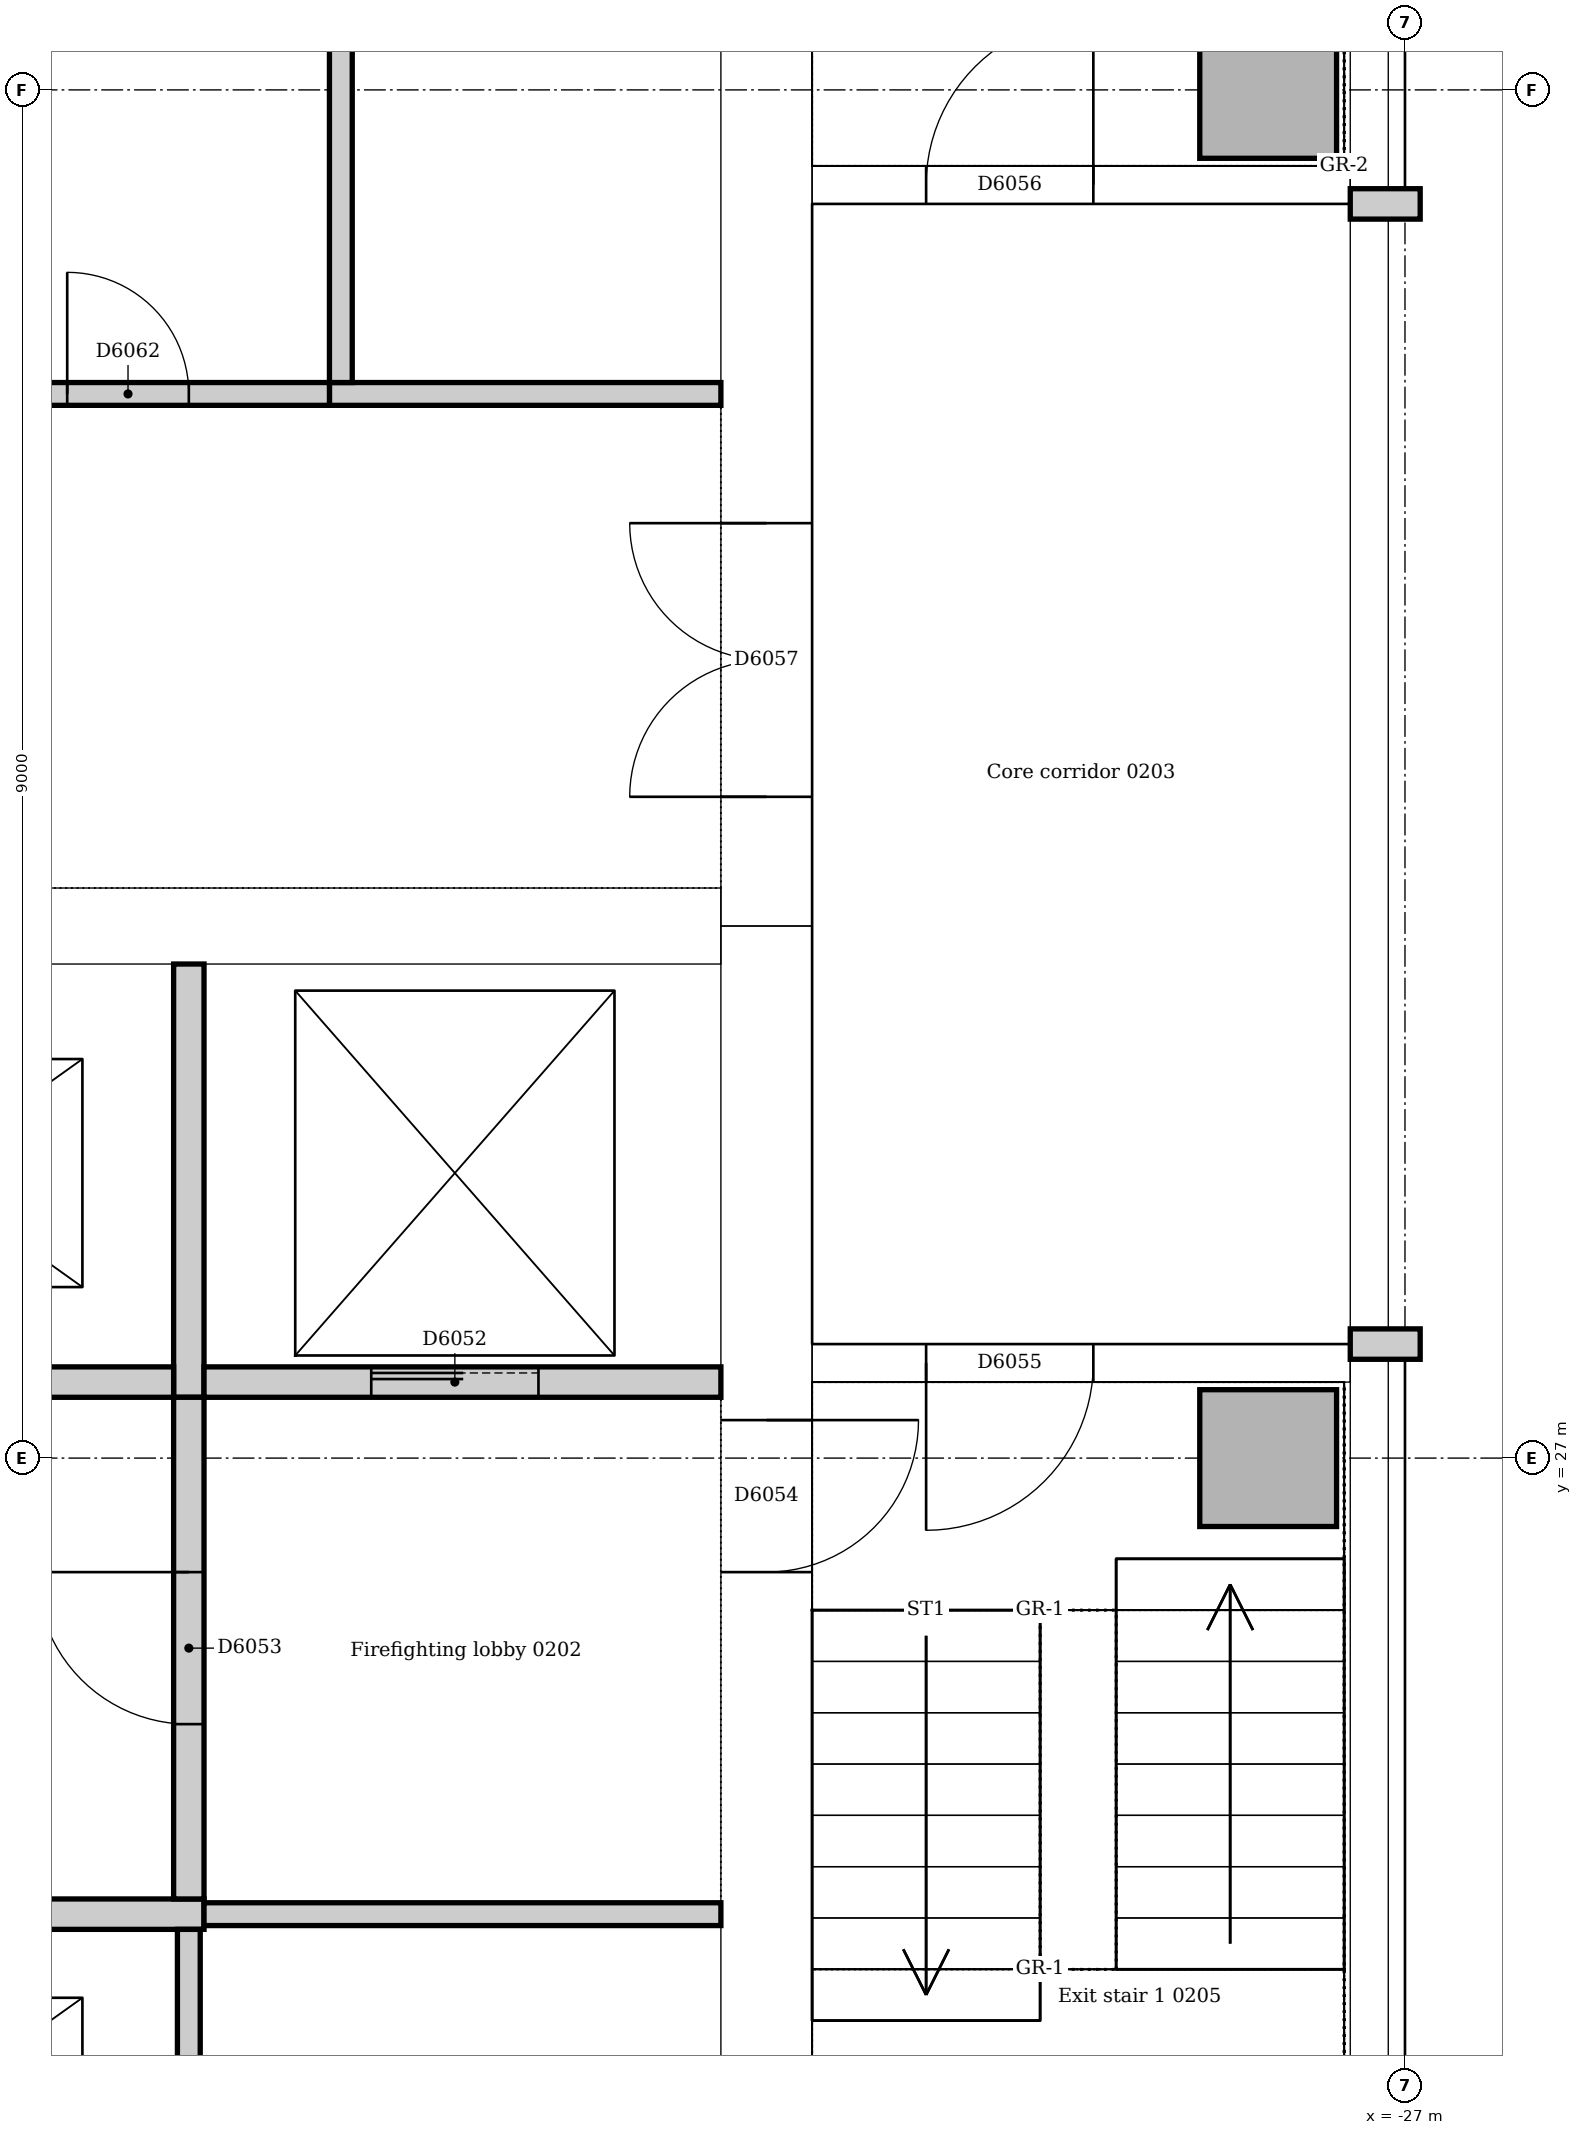
"""IFC4 building model, lengths in metres.
Left out: names, types, materials, properties, quantities, classifications, styles, units other than length and angle.
Written with IfcOpenShell. Run it as: python <this file> out.ifc"""

import sys

from ifc_helpers import new_model, si_unit, direction, frame, frame_2d, origin, origin_2d, place, context, subcontext, project, spatial, rectangle, extrude, element, fill, save


model = new_model("IFC4")
c1 = context("Model", 3, precision=1e-05, world=origin(), true_north=direction((0.0, 1.0)))
c2 = subcontext(c1, "Body", "Model", "MODEL_VIEW")
j1 = project(units=[si_unit("LENGTHUNIT", "METRE"), si_unit("PLANEANGLEUNIT", "RADIAN")], contexts=[c1])
p1 = place(None, origin())
s1 = spatial("IfcSite", under=j1, at=p1, CompositionType="ELEMENT")
p2 = place(p1, origin())
s2 = spatial("IfcBuilding", under=s1, at=p2, CompositionType="ELEMENT")
p3 = place(p2, frame((0.0, 0.0, 11.0)))
s3 = spatial("IfcBuildingStorey", under=s2, at=p3, CompositionType="ELEMENT", Elevation=11.0)
p4 = place(p3, frame((-31.2, 21.0, 0.0), z_axis=(0.0, 0.0, 1.0), x_axis=(0.0, 1.0, 0.0)))
e1 = element("IfcWall", 1, at=p4, inside=s3, PredefinedType="SOLIDWALL", context=c2, shape_type="SweptSolid", body=[
    extrude(rectangle(XDim=9.5, YDim=0.6, at=frame_2d((4.75, 0.0))), origin(), (0.0, 0.0, 1.0), 5.0),
])
p5 = place(p4, frame((5.25, 0.0, 0.0)))
e2 = element("IfcOpeningElement", 2, at=p5, cuts=e1, PredefinedType="OPENING", context=c2, shape_type="SweptSolid", body=[
    extrude(rectangle(XDim=1.0, YDim=2.1, at=frame_2d((0.5, 1.05))), frame((0.0, 0.31, 0.0), z_axis=(0.0, -1.0, 0.0), x_axis=(1.0, 0.0, 0.0)), (0.0, 0.0, 1.0), 0.62),
])
p6 = place(p3, frame((-31.2, 30.5, 0.0), z_axis=(0.0, 0.0, 1.0), x_axis=(0.0, 1.0, 0.0)))
e3 = element("IfcWall", 3, at=p6, inside=s3, PredefinedType="SOLIDWALL", context=c2, shape_type="SweptSolid", body=[
    extrude(rectangle(XDim=11.5, YDim=0.6, at=frame_2d((5.75, 0.0))), origin(), (0.0, 0.0, 1.0), 5.0),
])
p7 = place(p6, frame((0.85, 0.0, 0.0)))
e4 = element("IfcOpeningElement", 4, at=p7, cuts=e3, PredefinedType="OPENING", context=c2, shape_type="SweptSolid", body=[
    extrude(rectangle(XDim=1.8, YDim=2.1, at=frame_2d((0.9, 1.05))), frame((0.0, 0.31, 0.0), z_axis=(0.0, -1.0, 0.0), x_axis=(1.0, 0.0, 0.0)), (0.0, 0.0, 1.0), 0.62),
])
p8 = place(p3, frame((-42.0, 30.5, 0.0), z_axis=(0.0, 0.0, 1.0), x_axis=(1.0, 0.0, 0.0)))
e5 = element("IfcWall", 5, at=p8, inside=s3, PredefinedType="SOLIDWALL", context=c2, shape_type="SweptSolid", body=[
    extrude(rectangle(XDim=10.5, YDim=0.5, at=frame_2d((5.25, 0.0))), origin(), (0.0, 0.0, 1.0), 5.0),
])
p9 = place(p3, frame((-27.36, 27.625, 0.0), z_axis=(0.0, 0.0, 1.0), x_axis=(-1.0, 0.0, 0.0)))
e6 = element("IfcWall", 6, at=p9, inside=s3, PredefinedType="SOLIDWALL", context=c2, shape_type="SweptSolid", body=[
    extrude(rectangle(XDim=3.54, YDim=0.25, at=frame_2d((1.77, 0.0))), origin(), (0.0, 0.0, 1.0), 5.0),
])
p10 = place(p9, frame((1.69, 0.0, 0.0)))
e7 = element("IfcOpeningElement", 7, at=p10, cuts=e6, PredefinedType="OPENING", context=c2, shape_type="SweptSolid", body=[
    extrude(rectangle(XDim=1.1, YDim=2.1, at=frame_2d((0.55, 1.05))), frame((0.0, 0.135, 0.0), z_axis=(0.0, -1.0, 0.0), x_axis=(1.0, 0.0, 0.0)), (0.0, 0.0, 1.0), 0.27),
])
p11 = place(p3, frame((-30.9, 35.375, 0.0), z_axis=(0.0, 0.0, 1.0), x_axis=(1.0, 0.0, 0.0)))
e8 = element("IfcWall", 8, at=p11, inside=s3, PredefinedType="SOLIDWALL", context=c2, shape_type="SweptSolid", body=[
    extrude(rectangle(XDim=3.54, YDim=0.25, at=frame_2d((1.77, 0.0))), origin(), (0.0, 0.0, 1.0), 5.0),
])
p12 = place(p11, frame((0.75, 0.0, 0.0)))
e9 = element("IfcOpeningElement", 9, at=p12, cuts=e8, PredefinedType="OPENING", context=c2, shape_type="SweptSolid", body=[
    extrude(rectangle(XDim=1.1, YDim=2.1, at=frame_2d((0.55, 1.05))), frame((0.0, 0.135, 0.0), z_axis=(0.0, -1.0, 0.0), x_axis=(1.0, 0.0, 0.0)), (0.0, 0.0, 1.0), 0.27),
])
p13 = place(p3, frame((-27.235, 21.0, 0.0), z_axis=(0.0, 0.0, 1.0), x_axis=(0.0, 1.0, 0.0)))
e10 = element("IfcWall", 10, at=p13, inside=s3, PredefinedType="SOLIDWALL", context=c2, shape_type="SweptSolid", body=[
    extrude(rectangle(XDim=6.65, YDim=0.25, at=frame_2d((3.325, 0.0))), origin(), (0.0, 0.0, 1.0), 5.0),
])
p14 = place(p3, frame((-27.235, 27.85, 0.0), z_axis=(0.0, 0.0, 1.0), x_axis=(0.0, 1.0, 0.0)))
e11 = element("IfcWall", 11, at=p14, inside=s3, PredefinedType="SOLIDWALL", context=c2, shape_type="SweptSolid", body=[
    extrude(rectangle(XDim=7.3, YDim=0.25, at=frame_2d((3.65, 0.0))), origin(), (0.0, 0.0, 1.0), 5.0),
])
p15 = place(p3, frame((-27.235, 35.35, 0.0), z_axis=(0.0, 0.0, 1.0), x_axis=(0.0, 1.0, 0.0)))
e12 = element("IfcWall", 12, at=p15, inside=s3, PredefinedType="SOLIDWALL", context=c2, shape_type="SweptSolid", body=[
    extrude(rectangle(XDim=6.65, YDim=0.25, at=frame_2d((3.325, 0.0))), origin(), (0.0, 0.0, 1.0), 5.0),
])
for number, where, z_axis, x_axis in (
    (13, (-27.9, 27.0, 0.0), (0.0, 0.0, 1.0), (1.0, 0.0, 0.0)),
    (14, (-27.9, 36.0, 0.0), (0.0, 0.0, 1.0), (1.0, 0.0, 0.0)),
):
    element("IfcColumn", number, at=place(p3, frame(where, z_axis=z_axis, x_axis=x_axis)), inside=s3, PredefinedType="COLUMN", context=c2, shape_type="SweptSolid", body=[
        extrude(rectangle(XDim=0.9, YDim=0.9, at=origin_2d()), origin(), (0.0, 0.0, 1.0), 5.0),
    ])
p16 = place(p3, frame((-34.9, 24.0, 0.0), z_axis=(0.0, 0.0, 1.0), x_axis=(-1.0, 0.0, 0.0)))
e15 = element("IfcWall", 15, at=p16, inside=s3, PredefinedType="SOLIDWALL", context=c2, shape_type="SweptSolid", body=[
    extrude(rectangle(XDim=3.5, YDim=0.2, at=frame_2d((1.75, 0.0))), origin(), (0.0, 0.0, 1.0), 5.0),
])
p17 = place(p16, frame((1.3, 0.0, 0.0)))
e16 = element("IfcOpeningElement", 16, at=p17, cuts=e15, PredefinedType="OPENING", context=c2, shape_type="SweptSolid", body=[
    extrude(rectangle(XDim=1.1, YDim=2.1, at=frame_2d((0.55, 1.05))), frame((0.0, 0.11, 0.0), z_axis=(0.0, -1.0, 0.0), x_axis=(1.0, 0.0, 0.0)), (0.0, 0.0, 1.0), 0.22),
])
p18 = place(p3, frame((-35.0, 27.4, 0.0), z_axis=(0.0, 0.0, 1.0), x_axis=(0.0, 1.0, 0.0)))
e17 = element("IfcWall", 17, at=p18, inside=s3, PredefinedType="SOLIDWALL", context=c2, shape_type="SweptSolid", body=[
    extrude(rectangle(XDim=2.85, YDim=0.2, at=frame_2d((1.425, 0.0))), origin(), (0.0, 0.0, 1.0), 5.0),
])
p19 = place(p3, frame((-38.4, 27.5, 0.0), z_axis=(0.0, 0.0, 1.0), x_axis=(1.0, 0.0, 0.0)))
e18 = element("IfcWall", 18, at=p19, inside=s3, PredefinedType="SOLIDWALL", context=c2, shape_type="SweptSolid", body=[
    extrude(rectangle(XDim=3.3, YDim=0.2, at=frame_2d((1.65, 0.0))), origin(), (0.0, 0.0, 1.0), 5.0),
])
p20 = place(p19, frame((1.1, 0.0, 0.0)))
e19 = element("IfcOpeningElement", 19, at=p20, cuts=e18, PredefinedType="OPENING", context=c2, shape_type="SweptSolid", body=[
    extrude(rectangle(XDim=1.1, YDim=2.1, at=frame_2d((0.55, 1.05))), frame((0.0, 0.11, 0.0), z_axis=(0.0, -1.0, 0.0), x_axis=(1.0, 0.0, 0.0)), (0.0, 0.0, 1.0), 0.22),
])
p21 = place(p3, frame((-34.9, 27.5, 0.0), z_axis=(0.0, 0.0, 1.0), x_axis=(1.0, 0.0, 0.0)))
e20 = element("IfcWall", 20, at=p21, inside=s3, PredefinedType="SOLIDWALL", context=c2, shape_type="SweptSolid", body=[
    extrude(rectangle(XDim=3.4, YDim=0.2, at=frame_2d((1.7, 0.0))), origin(), (0.0, 0.0, 1.0), 5.0),
])
p22 = place(p21, frame((1.1, 0.0, 0.0)))
e21 = element("IfcOpeningElement", 21, at=p22, cuts=e20, PredefinedType="OPENING", context=c2, shape_type="SweptSolid", body=[
    extrude(rectangle(XDim=1.1, YDim=2.1, at=frame_2d((0.55, 1.05))), frame((0.0, 0.11, 0.0), z_axis=(0.0, -1.0, 0.0), x_axis=(1.0, 0.0, 0.0)), (0.0, 0.0, 1.0), 0.22),
])
p23 = place(p3, frame((-35.0, 24.1, 0.0), z_axis=(0.0, 0.0, 1.0), x_axis=(0.0, 1.0, 0.0)))
e22 = element("IfcWall", 22, at=p23, inside=s3, PredefinedType="SOLIDWALL", context=c2, shape_type="SweptSolid", body=[
    extrude(rectangle(XDim=3.3, YDim=0.2, at=frame_2d((1.65, 0.0))), origin(), (0.0, 0.0, 1.0), 5.0),
])
p24 = place(p23, frame((1.15, 0.0, 0.0)))
e23 = element("IfcOpeningElement", 23, at=p24, cuts=e22, PredefinedType="OPENING", context=c2, shape_type="SweptSolid", body=[
    extrude(rectangle(XDim=1.0, YDim=2.1, at=frame_2d((0.5, 1.05))), frame((0.0, 0.11, 0.0), z_axis=(0.0, -1.0, 0.0), x_axis=(1.0, 0.0, 0.0)), (0.0, 0.0, 1.0), 0.22),
])
for number, where, z_axis, x_axis in (
    (24, (-27.36, 27.75, 0.0), (0.0, 0.0, 1.0), (1.0, 0.0, 0.0)),
    (25, (-26.9, 35.25, 0.0), (0.0, 0.0, 1.0), (-1.0, 0.0, 0.0)),
):
    element("IfcWall", number, at=place(p3, frame(where, z_axis=z_axis, x_axis=x_axis)), inside=s3, PredefinedType="SOLIDWALL", context=c2, shape_type="SweptSolid", body=[
        extrude(rectangle(XDim=0.46, YDim=0.2, at=frame_2d((0.23, 0.0))), origin(), (0.0, 0.0, 1.0), 5.0),
    ])
p25 = place(p3, frame((-35.0, 21.0, 0.0), z_axis=(0.0, 0.0, 1.0), x_axis=(0.0, 1.0, 0.0)))
e26 = element("IfcWall", 26, at=p25, inside=s3, PredefinedType="SOLIDWALL", context=c2, shape_type="SweptSolid", body=[
    extrude(rectangle(XDim=2.9, YDim=0.15, at=frame_2d((1.45, 0.0))), origin(), (0.0, 0.0, 1.0), 5.0),
])
p26 = place(p3, frame((-31.5, 24.0, 0.0), z_axis=(0.0, 0.0, 1.0), x_axis=(-1.0, 0.0, 0.0)))
e27 = element("IfcWall", 27, at=p26, inside=s3, PredefinedType="SOLIDWALL", context=c2, shape_type="SweptSolid", body=[
    extrude(rectangle(XDim=3.4, YDim=0.15, at=frame_2d((1.7, 0.0))), origin(), (0.0, 0.0, 1.0), 5.0),
])
p27 = place(p3, frame((-34.075, 34.0, 0.0), z_axis=(0.0, 0.0, 1.0), x_axis=(1.0, 0.0, 0.0)))
e28 = element("IfcWall", 28, at=p27, inside=s3, PredefinedType="SOLIDWALL", context=c2, shape_type="SweptSolid", body=[
    extrude(rectangle(XDim=2.575, YDim=0.15, at=frame_2d((1.288, 0.0))), origin(), (0.0, 0.0, 1.0), 5.0),
])
p28 = place(p3, frame((-34.0, 41.075, 0.0), z_axis=(0.0, 0.0, 1.0), x_axis=(0.0, -1.0, 0.0)))
e29 = element("IfcWall", 29, at=p28, inside=s3, PredefinedType="SOLIDWALL", context=c2, shape_type="SweptSolid", body=[
    extrude(rectangle(XDim=7.0, YDim=0.15, at=frame_2d((3.5, 0.0))), origin(), (0.0, 0.0, 1.0), 5.0),
])
p29 = place(p3, frame((-34.075, 34.0, 0.0), z_axis=(0.0, 0.0, 1.0), x_axis=(-1.0, 0.0, 0.0)))
e30 = element("IfcWall", 30, at=p29, inside=s3, PredefinedType="PARTITIONING", context=c2, shape_type="SweptSolid", body=[
    extrude(rectangle(XDim=2.65, YDim=0.15, at=frame_2d((1.325, 0.0))), origin(), (0.0, 0.0, 1.0), 4.7),
])
p30 = place(p29, frame((0.925, 0.0, 0.0)))
e31 = element("IfcOpeningElement", 31, at=p30, cuts=e30, PredefinedType="OPENING", context=c2, shape_type="SweptSolid", body=[
    extrude(rectangle(XDim=0.8, YDim=2.1, at=frame_2d((0.4, 1.05))), frame((0.0, 0.085, 0.0), z_axis=(0.0, -1.0, 0.0), x_axis=(1.0, 0.0, 0.0)), (0.0, 0.0, 1.0), 0.17),
])
p31 = place(p22, origin())
e32 = element("IfcDoor", 32, at=p31, inside=s3, OperationType="SLIDING_TO_LEFT", PredefinedType="DOOR", context=c2, shape_type="SweptSolid", body=[
    extrude(rectangle(XDim=1.1, YDim=2.1, at=frame_2d((0.55, 1.05))), frame((0.0, 0.025, 0.0), z_axis=(0.0, -1.0, 0.0), x_axis=(1.0, 0.0, 0.0)), (0.0, 0.0, 1.0), 0.05),
])
fill(e21, e32)
p32 = place(p24, origin())
e33 = element("IfcDoor", 33, at=p32, inside=s3, OperationType="SINGLE_SWING_RIGHT", PredefinedType="DOOR", context=c2, shape_type="SweptSolid", body=[
    extrude(rectangle(XDim=1.0, YDim=2.1, at=frame_2d((0.5, 1.05))), frame((0.0, 0.025, 0.0), z_axis=(0.0, -1.0, 0.0), x_axis=(1.0, 0.0, 0.0)), (0.0, 0.0, 1.0), 0.05),
])
fill(e23, e33)
p33 = place(p5, frame((1.0, 0.0, 0.0), z_axis=(0.0, 0.0, 1.0), x_axis=(-1.0, 0.0, 0.0)))
e34 = element("IfcDoor", 34, at=p33, inside=s3, OperationType="SINGLE_SWING_LEFT", PredefinedType="DOOR", context=c2, shape_type="SweptSolid", body=[
    extrude(rectangle(XDim=1.0, YDim=2.1, at=frame_2d((0.5, 1.05))), frame((0.0, 0.025, 0.0), z_axis=(0.0, -1.0, 0.0), x_axis=(1.0, 0.0, 0.0)), (0.0, 0.0, 1.0), 0.05),
])
fill(e2, e34)
p34 = place(p10, origin())
e35 = element("IfcDoor", 35, at=p34, inside=s3, OperationType="SINGLE_SWING_RIGHT", PredefinedType="DOOR", context=c2, shape_type="SweptSolid", body=[
    extrude(rectangle(XDim=1.1, YDim=2.1, at=frame_2d((0.55, 1.05))), frame((0.0, 0.025, 0.0), z_axis=(0.0, -1.0, 0.0), x_axis=(1.0, 0.0, 0.0)), (0.0, 0.0, 1.0), 0.05),
])
fill(e7, e35)
p35 = place(p12, origin())
e36 = element("IfcDoor", 36, at=p35, inside=s3, OperationType="SINGLE_SWING_RIGHT", PredefinedType="DOOR", context=c2, shape_type="SweptSolid", body=[
    extrude(rectangle(XDim=1.1, YDim=2.1, at=frame_2d((0.55, 1.05))), frame((0.0, 0.025, 0.0), z_axis=(0.0, -1.0, 0.0), x_axis=(1.0, 0.0, 0.0)), (0.0, 0.0, 1.0), 0.05),
])
fill(e9, e36)
p36 = place(p7, origin())
e37 = element("IfcDoor", 37, at=p36, inside=s3, OperationType="DOUBLE_DOOR_SINGLE_SWING", PredefinedType="DOOR", context=c2, shape_type="SweptSolid", body=[
    extrude(rectangle(XDim=1.8, YDim=2.1, at=frame_2d((0.9, 1.05))), frame((0.0, 0.025, 0.0), z_axis=(0.0, -1.0, 0.0), x_axis=(1.0, 0.0, 0.0)), (0.0, 0.0, 1.0), 0.05),
])
fill(e4, e37)
p37 = place(p30, frame((0.8, 0.0, 0.0), z_axis=(0.0, 0.0, 1.0), x_axis=(-1.0, 0.0, 0.0)))
e38 = element("IfcDoor", 38, at=p37, inside=s3, OperationType="SINGLE_SWING_LEFT", PredefinedType="DOOR", context=c2, shape_type="SweptSolid", body=[
    extrude(rectangle(XDim=0.8, YDim=2.1, at=frame_2d((0.4, 1.05))), frame((0.0, 0.025, 0.0), z_axis=(0.0, -1.0, 0.0), x_axis=(1.0, 0.0, 0.0)), (0.0, 0.0, 1.0), 0.05),
])
fill(e31, e38)
save(model, sys.argv[1])
